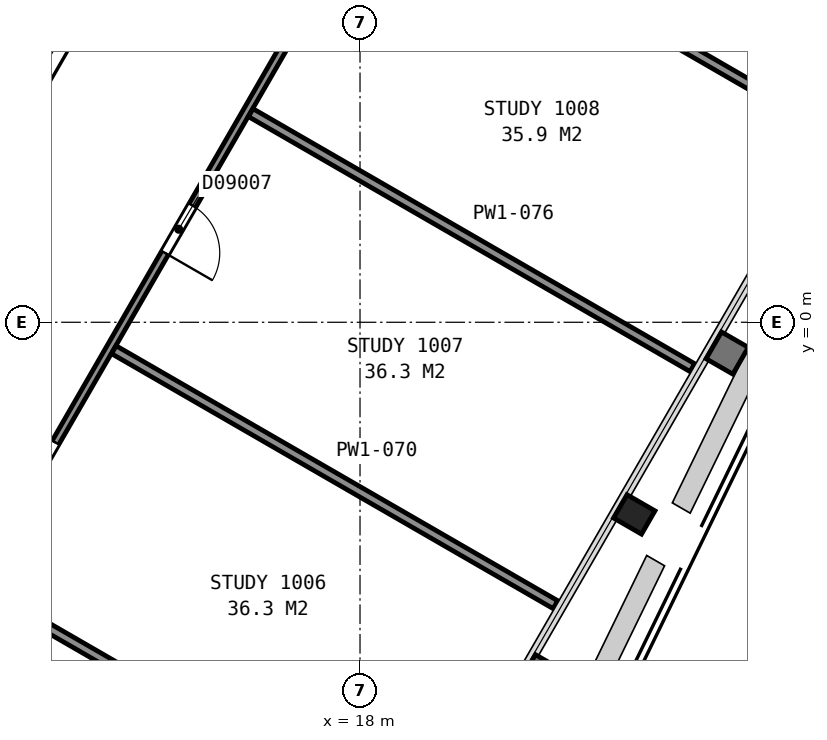
"""IFC4 building model, lengths in metres.
Left out: names, types, materials, properties, quantities, classifications, styles, units other than length and angle.
Written with IfcOpenShell. Run it as: python <this file> out.ifc"""

import sys

from ifc_helpers import new_model, si_unit, direction, frame, frame_2d, origin, origin_2d, place, context, subcontext, project, spatial, rectangle, i_section, extrude, element, fill, save


model = new_model("IFC4")
c1 = context("Model", 3, precision=1e-05, world=origin(), true_north=direction((0.0, 1.0)))
c2 = subcontext(c1, "Body", "Model", "MODEL_VIEW")
j1 = project(units=[si_unit("LENGTHUNIT", "METRE"), si_unit("PLANEANGLEUNIT", "RADIAN")], contexts=[c1])
p1 = place(None, origin())
s1 = spatial("IfcSite", under=j1, at=p1, CompositionType="ELEMENT")
p2 = place(p1, origin())
s2 = spatial("IfcBuilding", under=s1, at=p2, CompositionType="ELEMENT")
p3 = place(p2, frame((0.0, 0.0, 51.2)))
s3 = spatial("IfcBuildingStorey", under=s2, at=p3, CompositionType="ELEMENT", Elevation=51.2)
p4 = place(p3, frame((22.51, -3.16, 0.0), z_axis=(0.0, 0.0, 1.0), x_axis=(-0.5, -0.866025403784, 0.0)))
e1 = element("IfcColumn", 1, at=p4, inside=s3, PredefinedType="COLUMN", context=c2, shape_type="SweptSolid", body=[
    extrude(i_section(OverallWidth=0.442, OverallDepth=0.531, WebThickness=0.066, FlangeThickness=0.106, FilletRadius=0.015, at=origin_2d()), origin(), (0.0, 0.0, 1.0), 3.6),
])
p5 = place(p3, frame((7.678, 2.701, 0.0), z_axis=(0.0, 0.0, 1.0), x_axis=(0.866026010844, 0.49999894854, 0.0)))
e2 = element("IfcWall", 2, at=p5, inside=s3, PredefinedType="PARTITIONING", context=c2, shape_type="SweptSolid", body=[
    extrude(rectangle(XDim=12.0, YDim=0.2, at=frame_2d((6.0, 0.0))), origin(), (0.0, 0.0, 1.0), 3.35),
])
p6 = place(p3, frame((8.492, -3.012, 0.0), z_axis=(0.0, 0.0, 1.0), x_axis=(0.499972957231, 0.866041016371, 0.0)))
e3 = element("IfcWall", 3, at=p6, inside=s3, PredefinedType="PARTITIONING", context=c2, shape_type="SweptSolid", body=[
    extrude(rectangle(XDim=10.349, YDim=0.2, at=frame_2d((5.174, 0.0))), origin(), (0.0, 0.0, 1.0), 3.35),
])
p7 = place(p3, frame((17.833, 6.406, 0.0), z_axis=(0.0, 0.0, 1.0), x_axis=(-0.500002884005, -0.866023738697, 0.0)))
e4 = element("IfcWall", 4, at=p7, inside=s3, PredefinedType="PARTITIONING", context=c2, shape_type="SweptSolid", body=[
    extrude(rectangle(XDim=28.135, YDim=0.125, at=frame_2d((14.067, 0.0))), origin(), (0.0, 0.0, 1.0), 2.613),
])
p8 = place(p7, frame((26.522, 0.0, 0.0)))
e5 = element("IfcOpeningElement", 5, at=p8, cuts=e4, PredefinedType="OPENING", context=c2, shape_type="SweptSolid", body=[
    extrude(rectangle(XDim=0.9, YDim=2.1, at=frame_2d((0.45, 1.05))), frame((0.0, 0.073, 0.0), z_axis=(0.0, -1.0, 0.0), x_axis=(1.0, 0.0, 0.0)), (0.0, 0.0, 1.0), 0.145),
])
p9 = place(p7, frame((23.184, 0.0, 0.0)))
e6 = element("IfcOpeningElement", 6, at=p9, cuts=e4, PredefinedType="OPENING", context=c2, shape_type="SweptSolid", body=[
    extrude(rectangle(XDim=0.9, YDim=2.1, at=frame_2d((0.45, 1.05))), frame((0.0, 0.073, 0.0), z_axis=(0.0, -1.0, 0.0), x_axis=(1.0, 0.0, 0.0)), (0.0, 0.0, 1.0), 0.145),
])
p10 = place(p7, frame((18.683, 0.0, 0.0)))
e7 = element("IfcOpeningElement", 7, at=p10, cuts=e4, PredefinedType="OPENING", context=c2, shape_type="SweptSolid", body=[
    extrude(rectangle(XDim=0.9, YDim=2.1, at=frame_2d((0.45, 1.05))), frame((0.0, 0.073, 0.0), z_axis=(0.0, -1.0, 0.0), x_axis=(1.0, 0.0, 0.0)), (0.0, 0.0, 1.0), 0.145),
])
p11 = place(p7, frame((14.182, 0.0, 0.0)))
e8 = element("IfcOpeningElement", 8, at=p11, cuts=e4, PredefinedType="OPENING", context=c2, shape_type="SweptSolid", body=[
    extrude(rectangle(XDim=0.9, YDim=2.1, at=frame_2d((0.45, 1.05))), frame((0.0, 0.073, 0.0), z_axis=(0.0, -1.0, 0.0), x_axis=(1.0, 0.0, 0.0)), (0.0, 0.0, 1.0), 0.145),
])
p12 = place(p7, frame((9.681, 0.0, 0.0)))
e9 = element("IfcOpeningElement", 9, at=p12, cuts=e4, PredefinedType="OPENING", context=c2, shape_type="SweptSolid", body=[
    extrude(rectangle(XDim=0.9, YDim=2.1, at=frame_2d((0.45, 1.05))), frame((0.0, 0.073, 0.0), z_axis=(0.0, -1.0, 0.0), x_axis=(1.0, 0.0, 0.0)), (0.0, 0.0, 1.0), 0.145),
])
p13 = place(p7, frame((5.18, 0.0, 0.0)))
e10 = element("IfcOpeningElement", 10, at=p13, cuts=e4, PredefinedType="OPENING", context=c2, shape_type="SweptSolid", body=[
    extrude(rectangle(XDim=0.9, YDim=2.1, at=frame_2d((0.45, 1.05))), frame((0.0, 0.073, 0.0), z_axis=(0.0, -1.0, 0.0), x_axis=(1.0, 0.0, 0.0)), (0.0, 0.0, 1.0), 0.145),
])
p14 = place(p7, frame((1.278, 0.0, 0.0)))
e11 = element("IfcOpeningElement", 11, at=p14, cuts=e4, PredefinedType="OPENING", context=c2, shape_type="SweptSolid", body=[
    extrude(rectangle(XDim=0.9, YDim=2.1, at=frame_2d((0.45, 1.05))), frame((0.0, 0.073, 0.0), z_axis=(0.0, -1.0, 0.0), x_axis=(1.0, 0.0, 0.0)), (0.0, 0.0, 1.0), 0.145),
])
p15 = place(p3, frame((11.697, -4.347, 0.0), z_axis=(0.0, 0.0, 1.0), x_axis=(0.866005348532, -0.500034735108, 0.0)))
e12 = element("IfcWall", 12, at=p15, inside=s3, PredefinedType="PARTITIONING", context=c2, shape_type="SweptSolid", body=[
    extrude(rectangle(XDim=8.392, YDim=0.15, at=frame_2d((4.196, 0.0))), origin(), (0.0, 0.0, 1.0), 2.613),
])
p16 = place(p3, frame((13.951, -0.452, 0.0), z_axis=(0.0, 0.0, 1.0), x_axis=(0.866027553047, -0.499996277349, 0.0)))
e13 = element("IfcWall", 13, at=p16, inside=s3, PredefinedType="PARTITIONING", context=c2, shape_type="SweptSolid", body=[
    extrude(rectangle(XDim=8.387, YDim=0.15, at=frame_2d((4.193, 0.0))), origin(), (0.0, 0.0, 1.0), 2.613),
])
p17 = place(p3, frame((16.202, 3.447, 0.0), z_axis=(0.0, 0.0, 1.0), x_axis=(0.866047434595, -0.499961839574, 0.0)))
e14 = element("IfcWall", 14, at=p17, inside=s3, PredefinedType="PARTITIONING", context=c2, shape_type="SweptSolid", body=[
    extrude(rectangle(XDim=8.387, YDim=0.15, at=frame_2d((4.193, 0.0))), origin(), (0.0, 0.0, 1.0), 2.613),
])
p18 = place(p3, frame((19.088, 6.979, 0.0), z_axis=(0.0, 0.0, 1.0), x_axis=(0.865990629129, -0.500060226633, 0.0)))
e15 = element("IfcWall", 15, at=p18, inside=s3, PredefinedType="PARTITIONING", context=c2, shape_type="SweptSolid", body=[
    extrude(rectangle(XDim=7.654, YDim=0.15, at=frame_2d((3.827, 0.0))), origin(), (0.0, 0.0, 1.0), 2.613),
])
p19 = place(p12, origin())
e16 = element("IfcDoor", 16, at=p19, inside=s3, OperationType="SINGLE_SWING_LEFT", PredefinedType="DOOR", context=c2, shape_type="SweptSolid", body=[
    extrude(rectangle(XDim=0.9, YDim=2.1, at=frame_2d((0.45, 1.05))), frame((0.0, 0.025, 0.0), z_axis=(0.0, -1.0, 0.0), x_axis=(1.0, 0.0, 0.0)), (0.0, 0.0, 1.0), 0.05),
])
fill(e9, e16)
p20 = place(p13, origin())
e17 = element("IfcDoor", 17, at=p20, inside=s3, OperationType="SINGLE_SWING_RIGHT", PredefinedType="DOOR", context=c2, shape_type="SweptSolid", body=[
    extrude(rectangle(XDim=0.9, YDim=2.1, at=frame_2d((0.45, 1.05))), frame((0.0, 0.025, 0.0), z_axis=(0.0, -1.0, 0.0), x_axis=(1.0, 0.0, 0.0)), (0.0, 0.0, 1.0), 0.05),
])
fill(e10, e17)
save(model, sys.argv[1])
